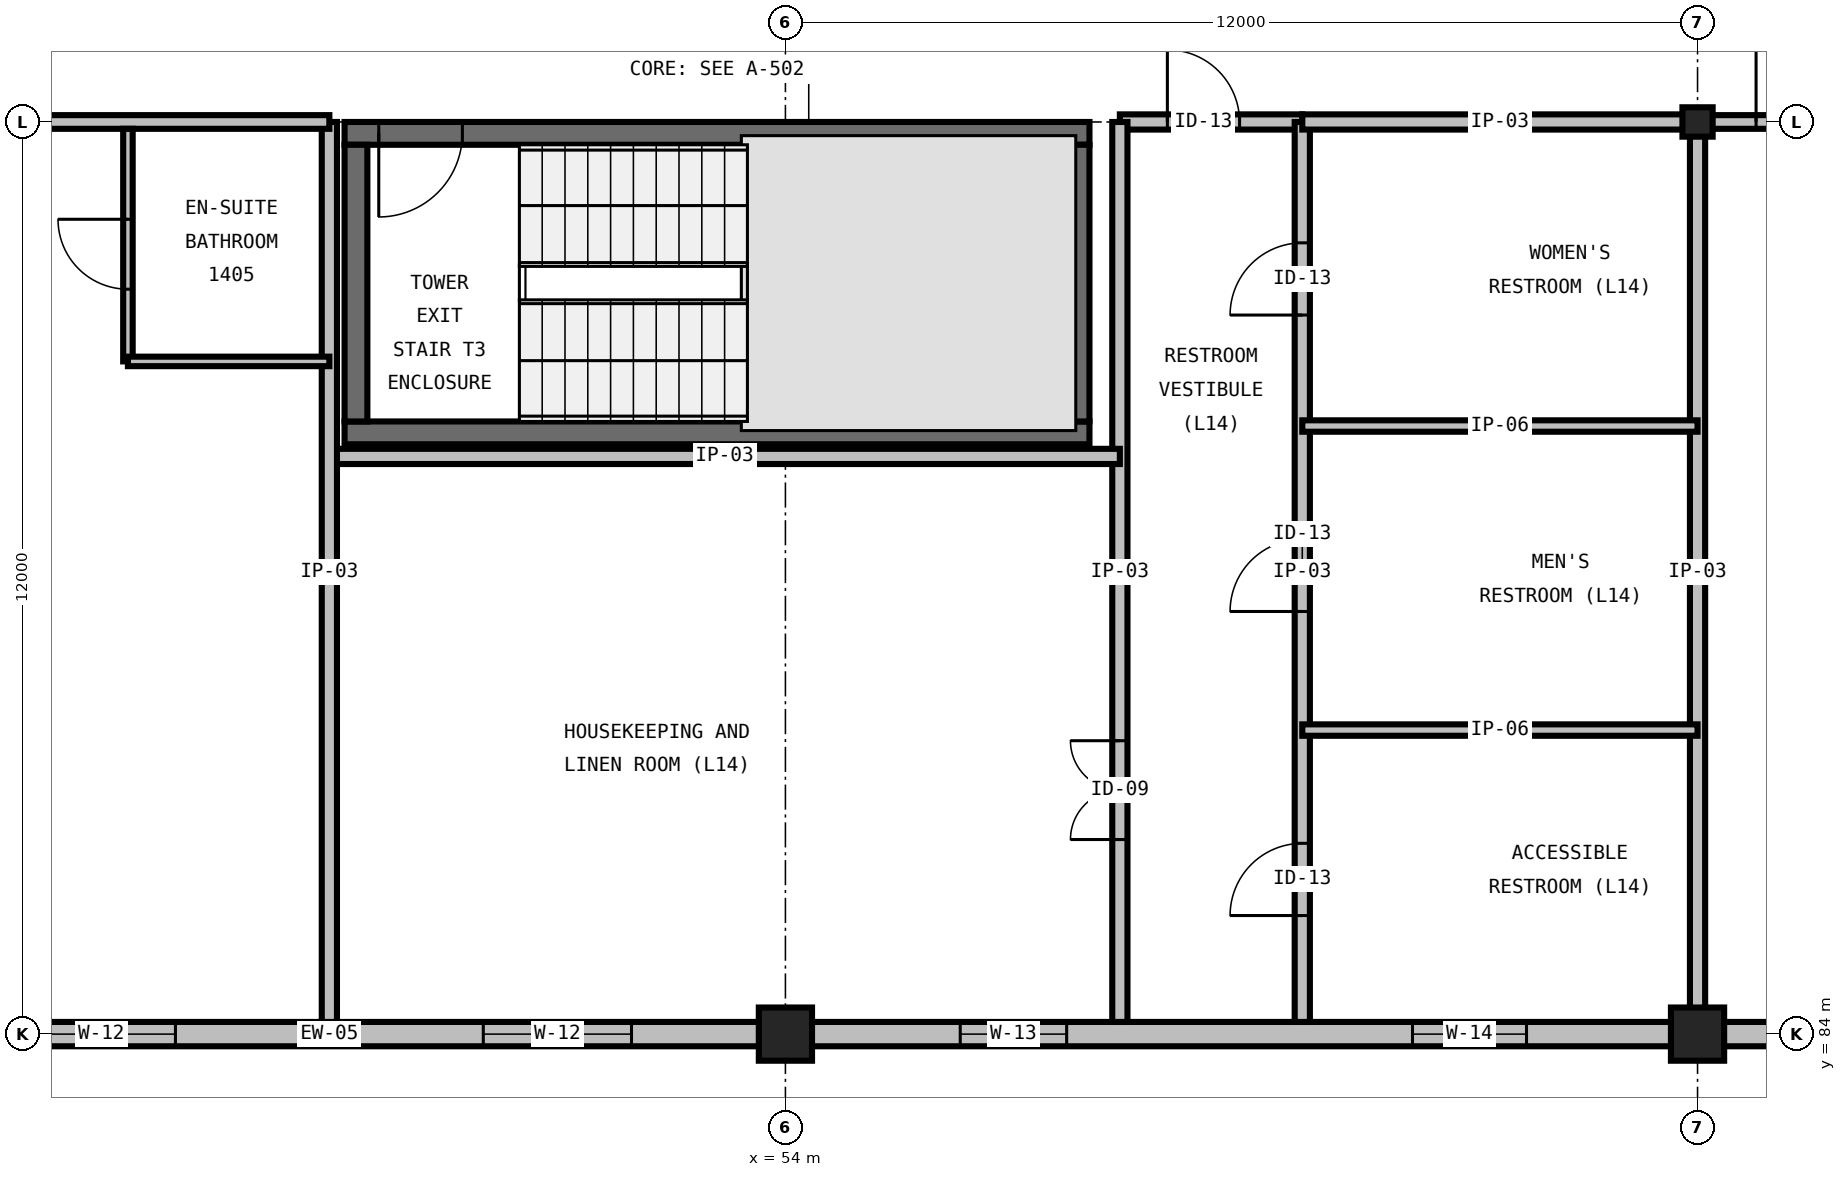
"""IFC4 building model, lengths in metres.
Left out: names, types, materials, properties, quantities, classifications, styles, units other than length and angle.
Written with IfcOpenShell. Run it as: python <this file> out.ifc"""

import sys

from ifc_helpers import new_model, si_unit, direction, frame, frame_2d, origin, origin_2d, place, context, subcontext, project, spatial, rectangle, i_section, extrude, element, fill, save


model = new_model("IFC4")
c1 = context("Model", 3, precision=1e-05, world=origin(), true_north=direction((0.0, 1.0)))
c2 = subcontext(c1, "Body", "Model", "MODEL_VIEW")
j1 = project(units=[si_unit("LENGTHUNIT", "METRE"), si_unit("PLANEANGLEUNIT", "RADIAN")], contexts=[c1])
p1 = place(None, origin())
s1 = spatial("IfcSite", under=j1, at=p1, CompositionType="ELEMENT")
p2 = place(p1, origin())
s2 = spatial("IfcBuilding", under=s1, at=p2, CompositionType="ELEMENT")
p3 = place(p2, frame((0.0, 0.0, 60.0)))
s3 = spatial("IfcBuildingStorey", under=s2, at=p3, CompositionType="ELEMENT", Elevation=60.0)
for number, where, z_axis, x_axis in (
    (1, (54.0, 84.0, 0.0), (0.0, 0.0, 1.0), (1.0, 0.0, 0.0)),
    (2, (66.0, 84.0, 0.0), (0.0, 0.0, 1.0), (1.0, 0.0, 0.0)),
):
    element("IfcColumn", number, at=place(p3, frame(where, z_axis=z_axis, x_axis=x_axis)), inside=s3, PredefinedType="COLUMN", context=c2, shape_type="SweptSolid", body=[
        extrude(rectangle(XDim=0.7, YDim=0.7, at=origin_2d()), origin(), (0.0, 0.0, 1.0), 3.6),
    ])
p4 = place(p3, frame((66.0, 96.0, 0.0), z_axis=(0.0, 0.0, 1.0), x_axis=(1.0, 0.0, 0.0)))
e3 = element("IfcColumn", 3, at=p4, inside=s3, PredefinedType="COLUMN", context=c2, shape_type="SweptSolid", body=[
    extrude(i_section(OverallWidth=0.398, OverallDepth=0.387, WebThickness=0.021, FlangeThickness=0.033, FilletRadius=0.031, at=origin_2d()), origin(), (0.0, 0.0, 1.0), 3.6),
])
p5 = place(p3, frame((48.2, 91.91, 0.0), z_axis=(0.0, 0.0, 1.0), x_axis=(1.0, 0.0, 0.0)))
e4 = element("IfcWall", 4, at=p5, inside=s3, PredefinedType="SHEAR", context=c2, shape_type="SweptSolid", body=[
    extrude(rectangle(XDim=9.8, YDim=0.3, at=frame_2d((4.9, 0.0))), origin(), (0.0, 0.0, 1.0), 3.6),
])
p6 = place(p3, frame((58.0, 95.85, 0.0), z_axis=(0.0, 0.0, 1.0), x_axis=(-1.0, 0.0, 0.0)))
e5 = element("IfcWall", 5, at=p6, inside=s3, PredefinedType="SHEAR", context=c2, shape_type="SweptSolid", body=[
    extrude(rectangle(XDim=9.8, YDim=0.3, at=frame_2d((4.9, 0.0))), origin(), (0.0, 0.0, 1.0), 3.6),
])
p7 = place(p6, frame((8.25, 0.0, 0.0)))
e6 = element("IfcOpeningElement", 6, at=p7, cuts=e5, PredefinedType="OPENING", context=c2, shape_type="SweptSolid", body=[
    extrude(rectangle(XDim=1.1, YDim=2.2, at=frame_2d((0.55, 1.1))), frame((0.0, 0.165, 0.0), z_axis=(0.0, -1.0, 0.0), x_axis=(1.0, 0.0, 0.0)), (0.0, 0.0, 1.0), 0.33),
])
for number, where, z_axis, x_axis in (
    (7, (48.35, 95.7, 0.0), (0.0, 0.0, 1.0), (0.0, -1.0, 0.0)),
    (8, (57.85, 92.06, 0.0), (0.0, 0.0, 1.0), (0.0, 1.0, 0.0)),
):
    element("IfcWall", number, at=place(p3, frame(where, z_axis=z_axis, x_axis=x_axis)), inside=s3, PredefinedType="SHEAR", context=c2, shape_type="SweptSolid", body=[
        extrude(rectangle(XDim=3.64, YDim=0.3, at=frame_2d((1.82, 0.0))), origin(), (0.0, 0.0, 1.0), 3.6),
    ])
p8 = place(p3, frame((42.0, 84.0, 0.0), z_axis=(0.0, 0.0, 1.0), x_axis=(1.0, 0.0, 0.0)))
e9 = element("IfcWall", 9, at=p8, inside=s3, PredefinedType="STANDARD", context=c2, shape_type="SweptSolid", body=[
    extrude(rectangle(XDim=12.0, YDim=0.32, at=frame_2d((6.0, 0.0))), origin(), (0.0, 0.0, 1.0), 2.536),
])
p9 = place(p8, frame((2.025, 0.0, 0.65)))
e10 = element("IfcOpeningElement", 10, at=p9, cuts=e9, PredefinedType="OPENING", context=c2, shape_type="SweptSolid", body=[
    extrude(rectangle(XDim=1.95, YDim=1.55, at=frame_2d((0.975, 0.775))), frame((0.0, 0.175, 0.0), z_axis=(0.0, -1.0, 0.0), x_axis=(1.0, 0.0, 0.0)), (0.0, 0.0, 1.0), 0.35),
])
p10 = place(p8, frame((8.025, 0.0, 0.65)))
e11 = element("IfcOpeningElement", 11, at=p10, cuts=e9, PredefinedType="OPENING", context=c2, shape_type="SweptSolid", body=[
    extrude(rectangle(XDim=1.95, YDim=1.55, at=frame_2d((0.975, 0.775))), frame((0.0, 0.175, 0.0), z_axis=(0.0, -1.0, 0.0), x_axis=(1.0, 0.0, 0.0)), (0.0, 0.0, 1.0), 0.35),
])
p11 = place(p3, frame((54.0, 84.0, 0.0), z_axis=(0.0, 0.0, 1.0), x_axis=(1.0, 0.0, 0.0)))
e12 = element("IfcWall", 12, at=p11, inside=s3, PredefinedType="STANDARD", context=c2, shape_type="SweptSolid", body=[
    extrude(rectangle(XDim=12.0, YDim=0.32, at=frame_2d((6.0, 0.0))), origin(), (0.0, 0.0, 1.0), 2.536),
])
p12 = place(p11, frame((2.3, 0.0, 1.0)))
e13 = element("IfcOpeningElement", 13, at=p12, cuts=e12, PredefinedType="OPENING", context=c2, shape_type="SweptSolid", body=[
    extrude(rectangle(XDim=1.4, YDim=1.4, at=frame_2d((0.7, 0.7))), frame((0.0, 0.175, 0.0), z_axis=(0.0, -1.0, 0.0), x_axis=(1.0, 0.0, 0.0)), (0.0, 0.0, 1.0), 0.35),
])
p13 = place(p11, frame((8.25, 0.0, 1.0)))
e14 = element("IfcOpeningElement", 14, at=p13, cuts=e12, PredefinedType="OPENING", context=c2, shape_type="SweptSolid", body=[
    extrude(rectangle(XDim=1.5, YDim=1.35, at=frame_2d((0.75, 0.675))), frame((0.0, 0.175, 0.0), z_axis=(0.0, -1.0, 0.0), x_axis=(1.0, 0.0, 0.0)), (0.0, 0.0, 1.0), 0.35),
])
p14 = place(p3, frame((66.0, 84.0, 0.0), z_axis=(0.0, 0.0, 1.0), x_axis=(1.0, 0.0, 0.0)))
e15 = element("IfcWall", 15, at=p14, inside=s3, PredefinedType="STANDARD", context=c2, shape_type="SweptSolid", body=[
    extrude(rectangle(XDim=12.0, YDim=0.32, at=frame_2d((6.0, 0.0))), origin(), (0.0, 0.0, 1.0), 2.536),
])
p15 = place(p14, frame((2.025, 0.0, 0.65)))
e16 = element("IfcOpeningElement", 16, at=p15, cuts=e15, PredefinedType="OPENING", context=c2, shape_type="SweptSolid", body=[
    extrude(rectangle(XDim=1.95, YDim=1.55, at=frame_2d((0.975, 0.775))), frame((0.0, 0.175, 0.0), z_axis=(0.0, -1.0, 0.0), x_axis=(1.0, 0.0, 0.0)), (0.0, 0.0, 1.0), 0.35),
])
p16 = place(p14, frame((8.025, 0.0, 0.65)))
e17 = element("IfcOpeningElement", 17, at=p16, cuts=e15, PredefinedType="OPENING", context=c2, shape_type="SweptSolid", body=[
    extrude(rectangle(XDim=1.95, YDim=1.55, at=frame_2d((0.975, 0.775))), frame((0.0, 0.175, 0.0), z_axis=(0.0, -1.0, 0.0), x_axis=(1.0, 0.0, 0.0)), (0.0, 0.0, 1.0), 0.35),
])
p17 = place(p3, frame((58.4, 96.0, 0.0), z_axis=(0.0, 0.0, 1.0), x_axis=(1.0, 0.0, 0.0)))
e18 = element("IfcWall", 18, at=p17, inside=s3, PredefinedType="PARTITIONING", context=c2, shape_type="SweptSolid", body=[
    extrude(rectangle(XDim=2.4, YDim=0.2, at=frame_2d((1.2, 0.0))), origin(), (0.0, 0.0, 1.0), 2.359),
])
p18 = place(p17, frame((0.625, 0.0, 0.0)))
e19 = element("IfcOpeningElement", 19, at=p18, cuts=e18, PredefinedType="OPENING", context=c2, shape_type="SweptSolid", body=[
    extrude(rectangle(XDim=0.95, YDim=2.15, at=frame_2d((0.475, 1.075))), frame((0.0, 0.115, 0.0), z_axis=(0.0, -1.0, 0.0), x_axis=(1.0, 0.0, 0.0)), (0.0, 0.0, 1.0), 0.23),
])
p19 = place(p3, frame((58.4, 84.16, 0.0), z_axis=(0.0, 0.0, 1.0), x_axis=(0.0, 1.0, 0.0)))
e20 = element("IfcWall", 20, at=p19, inside=s3, PredefinedType="PARTITIONING", context=c2, shape_type="SweptSolid", body=[
    extrude(rectangle(XDim=11.84, YDim=0.2, at=frame_2d((5.92, 0.0))), origin(), (0.0, 0.0, 1.0), 3.29),
])
p20 = place(p19, frame((2.4, 0.0, 0.0)))
e21 = element("IfcOpeningElement", 21, at=p20, cuts=e20, PredefinedType="OPENING", context=c2, shape_type="SweptSolid", body=[
    extrude(rectangle(XDim=1.3, YDim=2.2, at=frame_2d((0.65, 1.1))), frame((0.0, 0.115, 0.0), z_axis=(0.0, -1.0, 0.0), x_axis=(1.0, 0.0, 0.0)), (0.0, 0.0, 1.0), 0.23),
])
p21 = place(p3, frame((60.8, 84.16, 0.0), z_axis=(0.0, 0.0, 1.0), x_axis=(0.0, 1.0, 0.0)))
e22 = element("IfcWall", 22, at=p21, inside=s3, PredefinedType="PARTITIONING", context=c2, shape_type="SweptSolid", body=[
    extrude(rectangle(XDim=11.84, YDim=0.2, at=frame_2d((5.92, 0.0))), origin(), (0.0, 0.0, 1.0), 3.29),
])
p22 = place(p21, frame((1.4, 0.0, 0.0)))
e23 = element("IfcOpeningElement", 23, at=p22, cuts=e22, PredefinedType="OPENING", context=c2, shape_type="SweptSolid", body=[
    extrude(rectangle(XDim=0.95, YDim=2.15, at=frame_2d((0.475, 1.075))), frame((0.0, 0.115, 0.0), z_axis=(0.0, -1.0, 0.0), x_axis=(1.0, 0.0, 0.0)), (0.0, 0.0, 1.0), 0.23),
])
p23 = place(p21, frame((5.4, 0.0, 0.0)))
e24 = element("IfcOpeningElement", 24, at=p23, cuts=e22, PredefinedType="OPENING", context=c2, shape_type="SweptSolid", body=[
    extrude(rectangle(XDim=0.95, YDim=2.15, at=frame_2d((0.475, 1.075))), frame((0.0, 0.115, 0.0), z_axis=(0.0, -1.0, 0.0), x_axis=(1.0, 0.0, 0.0)), (0.0, 0.0, 1.0), 0.23),
])
p24 = place(p21, frame((9.3, 0.0, 0.0)))
e25 = element("IfcOpeningElement", 25, at=p24, cuts=e22, PredefinedType="OPENING", context=c2, shape_type="SweptSolid", body=[
    extrude(rectangle(XDim=0.95, YDim=2.15, at=frame_2d((0.475, 1.075))), frame((0.0, 0.115, 0.0), z_axis=(0.0, -1.0, 0.0), x_axis=(1.0, 0.0, 0.0)), (0.0, 0.0, 1.0), 0.23),
])
p25 = place(p3, frame((66.0, 84.16, 0.0), z_axis=(0.0, 0.0, 1.0), x_axis=(0.0, 1.0, 0.0)))
e26 = element("IfcWall", 26, at=p25, inside=s3, PredefinedType="PARTITIONING", context=c2, shape_type="SweptSolid", body=[
    extrude(rectangle(XDim=11.84, YDim=0.2, at=frame_2d((5.92, 0.0))), origin(), (0.0, 0.0, 1.0), 2.59),
])
p26 = place(p3, frame((60.8, 96.0, 0.0), z_axis=(0.0, 0.0, 1.0), x_axis=(1.0, 0.0, 0.0)))
e27 = element("IfcWall", 27, at=p26, inside=s3, PredefinedType="PARTITIONING", context=c2, shape_type="SweptSolid", body=[
    extrude(rectangle(XDim=5.2, YDim=0.2, at=frame_2d((2.6, 0.0))), origin(), (0.0, 0.0, 1.0), 2.359),
])
for number, where, z_axis, x_axis in (
    (28, (60.8, 88.0, 0.0), (0.0, 0.0, 1.0), (1.0, 0.0, 0.0)),
    (29, (60.8, 92.0, 0.0), (0.0, 0.0, 1.0), (1.0, 0.0, 0.0)),
):
    element("IfcWall", number, at=place(p3, frame(where, z_axis=z_axis, x_axis=x_axis)), inside=s3, PredefinedType="PARTITIONING", context=c2, shape_type="SweptSolid", body=[
        extrude(rectangle(XDim=5.2, YDim=0.15, at=frame_2d((2.6, 0.0))), origin(), (0.0, 0.0, 1.0), 3.29),
    ])
p27 = place(p3, frame((48.0, 91.6, 0.0), z_axis=(0.0, 0.0, 1.0), x_axis=(1.0, 0.0, 0.0)))
e30 = element("IfcWall", 30, at=p27, inside=s3, PredefinedType="PARTITIONING", context=c2, shape_type="SweptSolid", body=[
    extrude(rectangle(XDim=10.4, YDim=0.2, at=frame_2d((5.2, 0.0))), origin(), (0.0, 0.0, 1.0), 3.29),
])
p28 = place(p3, frame((48.0, 84.16, 0.0), z_axis=(0.0, 0.0, 1.0), x_axis=(0.0, 1.0, 0.0)))
e31 = element("IfcWall", 31, at=p28, inside=s3, PredefinedType="PARTITIONING", context=c2, shape_type="SweptSolid", body=[
    extrude(rectangle(XDim=11.84, YDim=0.2, at=frame_2d((5.92, 0.0))), origin(), (0.0, 0.0, 1.0), 3.29),
])
p29 = place(p3, frame((36.085, 96.0, 0.0), z_axis=(0.0, 0.0, 1.0), x_axis=(1.0, 0.0, 0.0)))
e32 = element("IfcWall", 32, at=p29, inside=s3, PredefinedType="PARTITIONING", context=c2, shape_type="SweptSolid", body=[
    extrude(rectangle(XDim=11.915, YDim=0.18, at=frame_2d((5.957, 0.0))), origin(), (0.0, 0.0, 1.0), 2.359),
])
p30 = place(p29, frame((0.685, 0.0, 0.0)))
e33 = element("IfcOpeningElement", 33, at=p30, cuts=e32, PredefinedType="OPENING", context=c2, shape_type="SweptSolid", body=[
    extrude(rectangle(XDim=1.1, YDim=2.2, at=frame_2d((0.55, 1.1))), frame((0.0, 0.105, 0.0), z_axis=(0.0, -1.0, 0.0), x_axis=(1.0, 0.0, 0.0)), (0.0, 0.0, 1.0), 0.21),
])
p31 = place(p3, frame((45.35, 92.85, 0.0), z_axis=(0.0, 0.0, 1.0), x_axis=(0.0, 1.0, 0.0)))
e34 = element("IfcWall", 34, at=p31, inside=s3, PredefinedType="PARTITIONING", context=c2, shape_type="SweptSolid", body=[
    extrude(rectangle(XDim=3.06, YDim=0.125, at=frame_2d((1.53, 0.0))), origin(), (0.0, 0.0, 1.0), 3.29),
])
p32 = place(p31, frame((0.95, 0.0, 0.0)))
e35 = element("IfcOpeningElement", 35, at=p32, cuts=e34, PredefinedType="OPENING", context=c2, shape_type="SweptSolid", body=[
    extrude(rectangle(XDim=0.92, YDim=2.1, at=frame_2d((0.46, 1.05))), frame((0.0, 0.077, 0.0), z_axis=(0.0, -1.0, 0.0), x_axis=(1.0, 0.0, 0.0)), (0.0, 0.0, 1.0), 0.155),
])
p33 = place(p3, frame((45.35, 92.85, 0.0), z_axis=(0.0, 0.0, 1.0), x_axis=(1.0, 0.0, 0.0)))
e36 = element("IfcWall", 36, at=p33, inside=s3, PredefinedType="PARTITIONING", context=c2, shape_type="SweptSolid", body=[
    extrude(rectangle(XDim=2.65, YDim=0.125, at=frame_2d((1.325, 0.0))), origin(), (0.0, 0.0, 1.0), 3.29),
])
p34 = place(p3, frame((66.0, 96.0, 0.0), z_axis=(0.0, 0.0, 1.0), x_axis=(1.0, 0.0, 0.0)))
e37 = element("IfcWall", 37, at=p34, inside=s3, PredefinedType="PARTITIONING", context=c2, shape_type="SweptSolid", body=[
    extrude(rectangle(XDim=11.915, YDim=0.18, at=frame_2d((5.957, 0.0))), origin(), (0.0, 0.0, 1.0), 2.664),
])
p35 = place(p34, frame((0.77, 0.0, 0.0)))
e38 = element("IfcOpeningElement", 38, at=p35, cuts=e37, PredefinedType="OPENING", context=c2, shape_type="SweptSolid", body=[
    extrude(rectangle(XDim=1.1, YDim=2.2, at=frame_2d((0.55, 1.1))), frame((0.0, 0.105, 0.0), z_axis=(0.0, -1.0, 0.0), x_axis=(1.0, 0.0, 0.0)), (0.0, 0.0, 1.0), 0.21),
])
p36 = place(p7, origin())
e39 = element("IfcDoor", 39, at=p36, inside=s3, OperationType="SINGLE_SWING_RIGHT", PredefinedType="DOOR", context=c2, shape_type="SweptSolid", body=[
    extrude(rectangle(XDim=1.1, YDim=2.2, at=frame_2d((0.55, 1.1))), frame((0.0, 0.025, 0.0), z_axis=(0.0, -1.0, 0.0), x_axis=(1.0, 0.0, 0.0)), (0.0, 0.0, 1.0), 0.05),
])
fill(e6, e39)
p37 = place(p9, origin())
e40 = element("IfcWindow", 40, at=p37, inside=s3, PartitioningType="DOUBLE_PANEL_VERTICAL", PredefinedType="WINDOW", context=c2, shape_type="SweptSolid", body=[
    extrude(rectangle(XDim=1.95, YDim=1.55, at=frame_2d((0.975, 0.775))), frame((0.0, 0.03, 0.0), z_axis=(0.0, -1.0, 0.0), x_axis=(1.0, 0.0, 0.0)), (0.0, 0.0, 1.0), 0.06),
])
fill(e10, e40)
p38 = place(p10, origin())
e41 = element("IfcWindow", 41, at=p38, inside=s3, PartitioningType="DOUBLE_PANEL_VERTICAL", PredefinedType="WINDOW", context=c2, shape_type="SweptSolid", body=[
    extrude(rectangle(XDim=1.95, YDim=1.55, at=frame_2d((0.975, 0.775))), frame((0.0, 0.03, 0.0), z_axis=(0.0, -1.0, 0.0), x_axis=(1.0, 0.0, 0.0)), (0.0, 0.0, 1.0), 0.06),
])
fill(e11, e41)
p39 = place(p12, origin())
e42 = element("IfcWindow", 42, at=p39, inside=s3, PartitioningType="SINGLE_PANEL", PredefinedType="WINDOW", context=c2, shape_type="SweptSolid", body=[
    extrude(rectangle(XDim=1.4, YDim=1.4, at=frame_2d((0.7, 0.7))), frame((0.0, 0.03, 0.0), z_axis=(0.0, -1.0, 0.0), x_axis=(1.0, 0.0, 0.0)), (0.0, 0.0, 1.0), 0.06),
])
fill(e13, e42)
p40 = place(p13, origin())
e43 = element("IfcWindow", 43, at=p40, inside=s3, PartitioningType="SINGLE_PANEL", PredefinedType="WINDOW", context=c2, shape_type="SweptSolid", body=[
    extrude(rectangle(XDim=1.5, YDim=1.35, at=frame_2d((0.75, 0.675))), frame((0.0, 0.03, 0.0), z_axis=(0.0, -1.0, 0.0), x_axis=(1.0, 0.0, 0.0)), (0.0, 0.0, 1.0), 0.06),
])
fill(e14, e43)
p41 = place(p18, origin())
e44 = element("IfcDoor", 44, at=p41, inside=s3, OperationType="SINGLE_SWING_LEFT", PredefinedType="DOOR", context=c2, shape_type="SweptSolid", body=[
    extrude(rectangle(XDim=0.95, YDim=2.15, at=frame_2d((0.475, 1.075))), frame((0.0, 0.025, 0.0), z_axis=(0.0, -1.0, 0.0), x_axis=(1.0, 0.0, 0.0)), (0.0, 0.0, 1.0), 0.05),
])
fill(e19, e44)
p42 = place(p20, origin())
e45 = element("IfcDoor", 45, at=p42, inside=s3, OperationType="DOUBLE_DOOR_SINGLE_SWING", PredefinedType="DOOR", context=c2, shape_type="SweptSolid", body=[
    extrude(rectangle(XDim=1.3, YDim=2.2, at=frame_2d((0.65, 1.1))), frame((0.0, 0.025, 0.0), z_axis=(0.0, -1.0, 0.0), x_axis=(1.0, 0.0, 0.0)), (0.0, 0.0, 1.0), 0.05),
])
fill(e21, e45)
p43 = place(p22, origin())
e46 = element("IfcDoor", 46, at=p43, inside=s3, OperationType="SINGLE_SWING_LEFT", PredefinedType="DOOR", context=c2, shape_type="SweptSolid", body=[
    extrude(rectangle(XDim=0.95, YDim=2.15, at=frame_2d((0.475, 1.075))), frame((0.0, 0.025, 0.0), z_axis=(0.0, -1.0, 0.0), x_axis=(1.0, 0.0, 0.0)), (0.0, 0.0, 1.0), 0.05),
])
fill(e23, e46)
p44 = place(p23, origin())
e47 = element("IfcDoor", 47, at=p44, inside=s3, OperationType="SINGLE_SWING_LEFT", PredefinedType="DOOR", context=c2, shape_type="SweptSolid", body=[
    extrude(rectangle(XDim=0.95, YDim=2.15, at=frame_2d((0.475, 1.075))), frame((0.0, 0.025, 0.0), z_axis=(0.0, -1.0, 0.0), x_axis=(1.0, 0.0, 0.0)), (0.0, 0.0, 1.0), 0.05),
])
fill(e24, e47)
p45 = place(p24, origin())
e48 = element("IfcDoor", 48, at=p45, inside=s3, OperationType="SINGLE_SWING_LEFT", PredefinedType="DOOR", context=c2, shape_type="SweptSolid", body=[
    extrude(rectangle(XDim=0.95, YDim=2.15, at=frame_2d((0.475, 1.075))), frame((0.0, 0.025, 0.0), z_axis=(0.0, -1.0, 0.0), x_axis=(1.0, 0.0, 0.0)), (0.0, 0.0, 1.0), 0.05),
])
fill(e25, e48)
p46 = place(p32, origin())
e49 = element("IfcDoor", 49, at=p46, inside=s3, OperationType="SINGLE_SWING_RIGHT", PredefinedType="DOOR", context=c2, shape_type="SweptSolid", body=[
    extrude(rectangle(XDim=0.92, YDim=2.1, at=frame_2d((0.46, 1.05))), frame((0.0, 0.025, 0.0), z_axis=(0.0, -1.0, 0.0), x_axis=(1.0, 0.0, 0.0)), (0.0, 0.0, 1.0), 0.05),
])
fill(e35, e49)
p47 = place(p35, origin())
e50 = element("IfcDoor", 50, at=p47, inside=s3, OperationType="SINGLE_SWING_LEFT", PredefinedType="DOOR", context=c2, shape_type="SweptSolid", body=[
    extrude(rectangle(XDim=1.1, YDim=2.2, at=frame_2d((0.55, 1.1))), frame((0.0, 0.025, 0.0), z_axis=(0.0, -1.0, 0.0), x_axis=(1.0, 0.0, 0.0)), (0.0, 0.0, 1.0), 0.05),
])
fill(e38, e50)
save(model, sys.argv[1])
